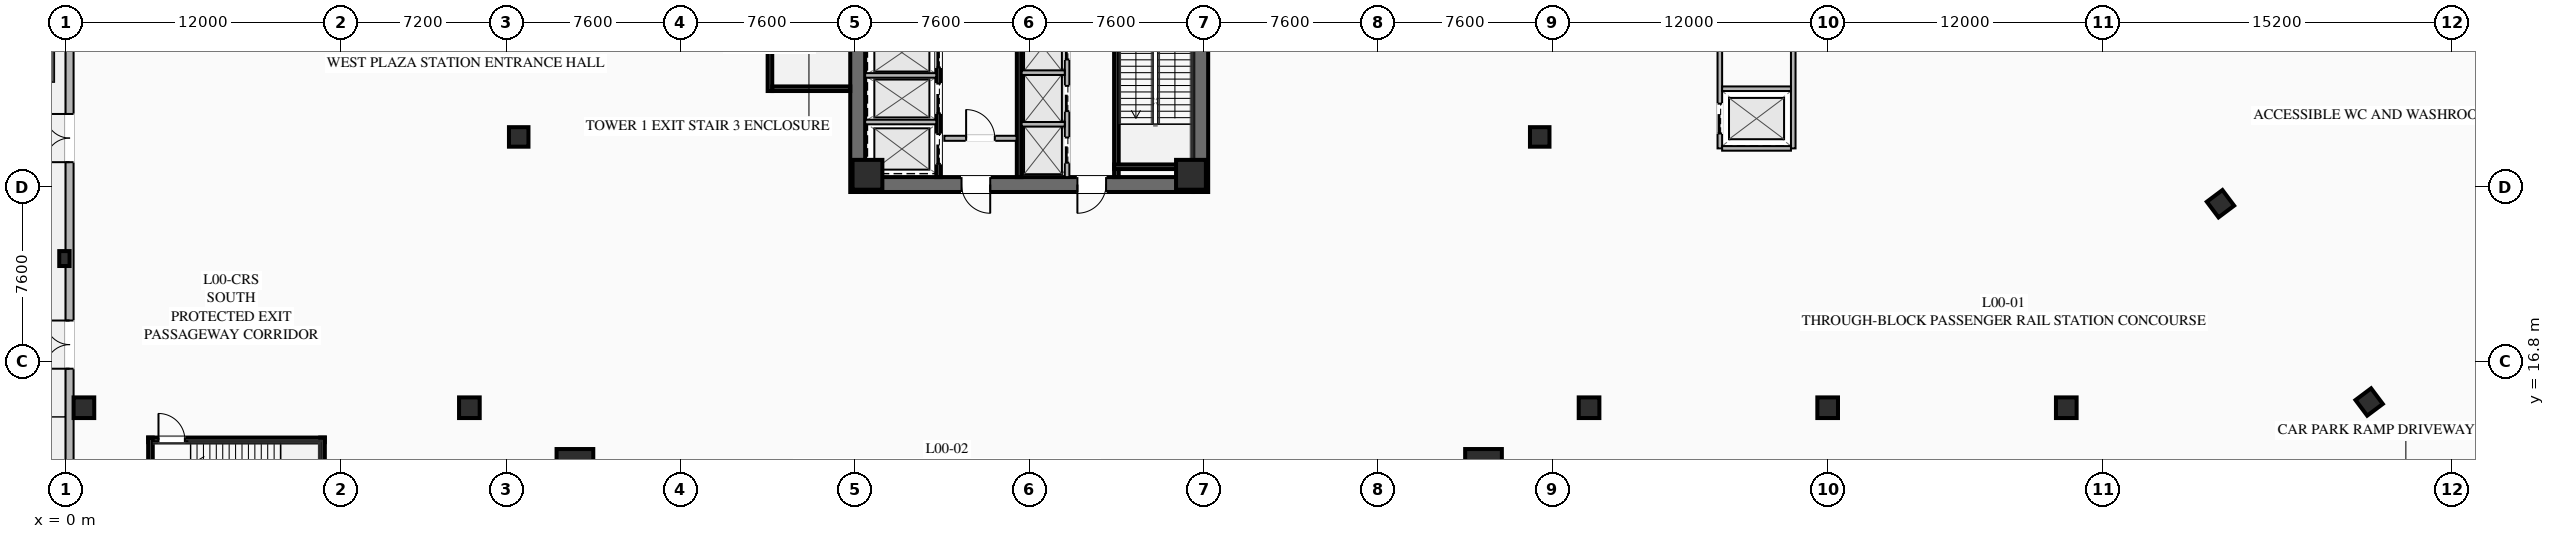
"""IFC4 building model, lengths in metres.
Left out: names, types, materials, properties, quantities, classifications, styles, units other than length and angle.
Written with IfcOpenShell. Run it as: python <this file> out.ifc"""

import sys

from ifc_helpers import new_model, si_unit, direction, frame, frame_2d, origin, origin_2d, place, context, subcontext, project, spatial, rectangle, hollow_rectangle, extrude, element, fill, save


model = new_model("IFC4")
c1 = context("Model", 3, precision=1e-05, world=origin(), true_north=direction((0.0, 1.0)))
c2 = subcontext(c1, "Body", "Model", "MODEL_VIEW")
j1 = project(units=[si_unit("LENGTHUNIT", "METRE"), si_unit("PLANEANGLEUNIT", "RADIAN")], contexts=[c1])
p1 = place(None, origin())
s1 = spatial("IfcSite", under=j1, at=p1, CompositionType="ELEMENT")
p2 = place(p1, origin())
s2 = spatial("IfcBuilding", under=s1, at=p2, CompositionType="ELEMENT")
p3 = place(p2, origin())
s3 = spatial("IfcBuildingStorey", under=s2, at=p3, CompositionType="ELEMENT", Elevation=0.0)
for number, where, z_axis, x_axis in (
    (1, (34.525, 24.2, 0.0), (0.0, 0.0, 1.0), (0.0, 1.0, 0.0)),
    (2, (49.475, 39.8, 0.0), (0.0, 0.0, 1.0), (0.0, -1.0, 0.0)),
):
    element("IfcWall", number, at=place(p3, frame(where, z_axis=z_axis, x_axis=x_axis)), inside=s3, PredefinedType="SHEAR", context=c2, shape_type="SweptSolid", body=[
        extrude(rectangle(XDim=15.6, YDim=0.65, at=frame_2d((7.8, 0.0))), origin(), (0.0, 0.0, 1.0), 5.4),
    ])
p4 = place(p3, frame((49.15, 24.525, 0.0), z_axis=(0.0, 0.0, 1.0), x_axis=(-1.0, 0.0, 0.0)))
e3 = element("IfcWall", 3, at=p4, inside=s3, PredefinedType="SHEAR", context=c2, shape_type="SweptSolid", body=[
    extrude(rectangle(XDim=14.3, YDim=0.65, at=frame_2d((7.15, 0.0))), origin(), (0.0, 0.0, 1.0), 5.4),
])
p5 = place(p4, frame((8.85, 0.0, 0.0)))
e4 = element("IfcOpeningElement", 4, at=p5, cuts=e3, PredefinedType="OPENING", context=c2, shape_type="SweptSolid", body=[
    extrude(rectangle(XDim=1.25, YDim=2.25, at=frame_2d((0.625, 1.125))), frame((0.0, 0.335, 0.0), z_axis=(0.0, -1.0, 0.0), x_axis=(1.0, 0.0, 0.0)), (0.0, 0.0, 1.0), 0.67),
])
p6 = place(p4, frame((3.8, 0.0, 0.0)))
e5 = element("IfcOpeningElement", 5, at=p6, cuts=e3, PredefinedType="OPENING", context=c2, shape_type="SweptSolid", body=[
    extrude(rectangle(XDim=1.25, YDim=2.25, at=frame_2d((0.625, 1.125))), frame((0.0, 0.335, 0.0), z_axis=(0.0, -1.0, 0.0), x_axis=(1.0, 0.0, 0.0)), (0.0, 0.0, 1.0), 0.67),
])
for number, where, z_axis, x_axis in (
    (6, (34.95, 24.95, 0.0), (0.0, 0.0, 1.0), (1.0, 0.0, 0.0)),
    (7, (49.05, 24.95, 0.0), (0.0, 0.0, 1.0), (1.0, 0.0, 0.0)),
):
    element("IfcColumn", number, at=place(p3, frame(where, z_axis=z_axis, x_axis=x_axis)), inside=s3, PredefinedType="COLUMN", context=c2, shape_type="SweptSolid", body=[
        extrude(hollow_rectangle(XDim=1.3, YDim=1.3, WallThickness=0.05, at=origin_2d()), origin(), (0.0, 0.0, 1.0), 5.14),
    ])
for number, where, z_axis, x_axis in (
    (8, (22.2, 12.2, 0.0), (0.0, 0.0, 1.0), (1.0, 0.0, 0.0)),
    (9, (61.8, 12.2, 0.0), (0.0, 0.0, 1.0), (1.0, 0.0, 0.0)),
):
    element("IfcColumn", number, at=place(p3, frame(where, z_axis=z_axis, x_axis=x_axis)), inside=s3, PredefinedType="COLUMN", context=c2, shape_type="SweptSolid", body=[
        extrude(hollow_rectangle(XDim=1.6, YDim=1.6, WallThickness=0.06, at=origin_2d()), origin(), (0.0, 0.0, 1.0), 5.14),
    ])
for number, where, z_axis, x_axis in (
    (10, (64.25, 26.6, 0.0), (0.0, 0.0, 1.0), (1.0, 0.0, 0.0)),
    (11, (19.75, 26.6, 0.0), (0.0, 0.0, 1.0), (1.0, 0.0, 0.0)),
):
    element("IfcColumn", number, at=place(p3, frame(where, z_axis=z_axis, x_axis=x_axis)), inside=s3, PredefinedType="COLUMN", context=c2, shape_type="SweptSolid", body=[
        extrude(hollow_rectangle(XDim=0.85, YDim=0.85, WallThickness=0.035, at=origin_2d()), origin(), (0.0, 0.0, 1.0), 5.14),
    ])
p7 = place(p3, frame((112.476, 21.107, 0.0), z_axis=(0.0, 0.0, 1.0), x_axis=(-0.600005007985, 0.799996243986, 0.0)))
e12 = element("IfcWall", 12, at=p7, inside=s3, PredefinedType="SHEAR", context=c2, shape_type="SweptSolid", body=[
    extrude(rectangle(XDim=15.6, YDim=0.65, at=frame_2d((7.8, 0.0))), origin(), (0.0, 0.0, 1.0), 5.4),
])
for number, where, z_axis, x_axis in (
    (13, (93.92, 23.69, 0.0), (0.0, 0.0, 1.0), (0.8, 0.6, 0.0)),
    (14, (100.4, 15.05, 0.0), (0.0, 0.0, 1.0), (0.8, 0.6, 0.0)),
):
    element("IfcColumn", number, at=place(p3, frame(where, z_axis=z_axis, x_axis=x_axis)), inside=s3, PredefinedType="COLUMN", context=c2, shape_type="SweptSolid", body=[
        extrude(hollow_rectangle(XDim=0.85, YDim=0.85, WallThickness=0.035, at=origin_2d()), origin(), (0.0, 0.0, 1.0), 5.14),
    ])
for number, where, z_axis, x_axis in (
    (15, (0.8, 14.8, 0.0), (0.0, 0.0, 1.0), (1.0, 0.0, 0.0)),
    (16, (17.6, 14.8, 0.0), (0.0, 0.0, 1.0), (1.0, 0.0, 0.0)),
    (17, (66.4, 14.8, 0.0), (0.0, 0.0, 1.0), (1.0, 0.0, 0.0)),
    (18, (76.8, 14.8, 0.0), (0.0, 0.0, 1.0), (1.0, 0.0, 0.0)),
    (19, (87.2, 14.8, 0.0), (0.0, 0.0, 1.0), (1.0, 0.0, 0.0)),
):
    element("IfcColumn", number, at=place(p3, frame(where, z_axis=z_axis, x_axis=x_axis)), inside=s3, PredefinedType="COLUMN", context=c2, shape_type="SweptSolid", body=[
        extrude(rectangle(XDim=0.9, YDim=0.9, at=origin_2d()), origin(), (0.0, 0.0, 1.0), 5.14),
    ])
p8 = place(p3, frame((0.175, 0.35, 0.0), z_axis=(0.0, 0.0, 1.0), x_axis=(0.0, 1.0, 0.0)))
e20 = element("IfcWall", 20, at=p8, inside=s3, PredefinedType="SOLIDWALL", context=c2, shape_type="SweptSolid", body=[
    extrude(rectangle(XDim=63.3, YDim=0.35, at=frame_2d((31.65, 0.0))), origin(), (0.0, 0.0, 1.0), 5.14),
])
p9 = place(p8, frame((16.15, 0.0, 0.0)))
e21 = element("IfcOpeningElement", 21, at=p9, cuts=e20, PredefinedType="OPENING", context=c2, shape_type="SweptSolid", body=[
    extrude(rectangle(XDim=2.1, YDim=2.5, at=frame_2d((1.05, 1.25))), frame((0.0, 0.185, 0.0), z_axis=(0.0, -1.0, 0.0), x_axis=(1.0, 0.0, 0.0)), (0.0, 0.0, 1.0), 0.37),
])
p10 = place(p8, frame((25.15, 0.0, 0.0)))
e22 = element("IfcOpeningElement", 22, at=p10, cuts=e20, PredefinedType="OPENING", context=c2, shape_type="SweptSolid", body=[
    extrude(rectangle(XDim=2.1, YDim=2.5, at=frame_2d((1.05, 1.25))), frame((0.0, 0.185, 0.0), z_axis=(0.0, -1.0, 0.0), x_axis=(1.0, 0.0, 0.0)), (0.0, 0.0, 1.0), 0.37),
])
p11 = place(p8, frame((34.15, 0.0, 0.0)))
e23 = element("IfcOpeningElement", 23, at=p11, cuts=e20, PredefinedType="OPENING", context=c2, shape_type="SweptSolid", body=[
    extrude(rectangle(XDim=2.1, YDim=2.5, at=frame_2d((1.05, 1.25))), frame((0.0, 0.185, 0.0), z_axis=(0.0, -1.0, 0.0), x_axis=(1.0, 0.0, 0.0)), (0.0, 0.0, 1.0), 0.37),
])
p12 = place(p8, frame((39.85, 0.0, 0.0)))
e24 = element("IfcOpeningElement", 24, at=p12, cuts=e20, PredefinedType="OPENING", context=c2, shape_type="SweptSolid", body=[
    extrude(rectangle(XDim=2.1, YDim=2.5, at=frame_2d((1.05, 1.25))), frame((0.0, 0.185, 0.0), z_axis=(0.0, -1.0, 0.0), x_axis=(1.0, 0.0, 0.0)), (0.0, 0.0, 1.0), 0.37),
])
p13 = place(p3, frame((-0.05, 21.3, 0.0), z_axis=(0.0, 0.0, 1.0), x_axis=(0.0, 1.0, 0.0)))
e25 = element("IfcColumn", 25, at=p13, inside=s3, PredefinedType="PILASTER", context=c2, shape_type="SweptSolid", body=[
    extrude(rectangle(XDim=0.65, YDim=0.45, at=origin_2d()), origin(), (0.0, 0.0, 1.0), 5.14),
])
p14 = place(p3, frame((45.8, 24.85, 0.0), z_axis=(0.0, 0.0, 1.0), x_axis=(0.0, 1.0, 0.0)))
e26 = element("IfcWall", 26, at=p14, inside=s3, PredefinedType="SHEAR", context=c2, shape_type="SweptSolid", body=[
    extrude(rectangle(XDim=7.95, YDim=0.2, at=frame_2d((3.975, 0.0))), origin(), (0.0, 0.0, 1.0), 5.14),
])
p15 = place(p14, frame((6.3, 0.0, 0.0)))
e27 = element("IfcOpeningElement", 27, at=p15, cuts=e26, PredefinedType="OPENING", context=c2, shape_type="SweptSolid", body=[
    extrude(rectangle(XDim=1.15, YDim=2.2, at=frame_2d((0.575, 1.1))), frame((0.0, 0.11, 0.0), z_axis=(0.0, -1.0, 0.0), x_axis=(1.0, 0.0, 0.0)), (0.0, 0.0, 1.0), 0.22),
])
p16 = place(p3, frame((45.7, 25.3, 0.0), z_axis=(0.0, 0.0, 1.0), x_axis=(1.0, 0.0, 0.0)))
e28 = element("IfcWall", 28, at=p16, inside=s3, PredefinedType="SHEAR", context=c2, shape_type="SweptSolid", body=[
    extrude(rectangle(XDim=3.45, YDim=0.2, at=frame_2d((1.725, 0.0))), origin(), (0.0, 0.0, 1.0), 5.14),
])
p17 = place(p3, frame((41.56, 24.85, 0.0), z_axis=(0.0, 0.0, 1.0), x_axis=(0.0, 1.0, 0.0)))
e29 = element("IfcWall", 29, at=p17, inside=s3, PredefinedType="SHEAR", context=c2, shape_type="SweptSolid", body=[
    extrude(rectangle(XDim=14.3, YDim=0.2, at=frame_2d((7.15, 0.0))), origin(), (0.0, 0.0, 1.0), 5.14),
])
p18 = place(p3, frame((38.3, 26.54, 0.0), z_axis=(0.0, 0.0, 1.0), x_axis=(1.0, 0.0, 0.0)))
e30 = element("IfcWall", 30, at=p18, inside=s3, PredefinedType="SOLIDWALL", context=c2, shape_type="SweptSolid", body=[
    extrude(rectangle(XDim=3.15, YDim=0.22, at=frame_2d((1.575, 0.0))), origin(), (0.0, 0.0, 1.0), 3.31),
])
p19 = place(p18, frame((0.95, 0.0, 0.0)))
e31 = element("IfcOpeningElement", 31, at=p19, cuts=e30, PredefinedType="OPENING", context=c2, shape_type="SweptSolid", body=[
    extrude(rectangle(XDim=1.25, YDim=2.25, at=frame_2d((0.625, 1.125))), frame((0.0, 0.12, 0.0), z_axis=(0.0, -1.0, 0.0), x_axis=(1.0, 0.0, 0.0)), (0.0, 0.0, 1.0), 0.24),
])
p20 = place(p3, frame((38.05, 24.85, 0.0), z_axis=(0.0, 0.0, 1.0), x_axis=(0.0, 1.0, 0.0)))
e32 = element("IfcWall", 32, at=p20, inside=s3, PredefinedType="SHEAR", context=c2, shape_type="SweptSolid", body=[
    extrude(rectangle(XDim=6.35, YDim=0.2, at=frame_2d((3.175, 0.0))), origin(), (0.0, 0.0, 1.0), 5.14),
])
p21 = place(p20, frame((4.775, 0.0, 0.0)))
e33 = element("IfcOpeningElement", 33, at=p21, cuts=e32, PredefinedType="OPENING", context=c2, shape_type="SweptSolid", body=[
    extrude(rectangle(XDim=1.3, YDim=2.25, at=frame_2d((0.65, 1.125))), frame((0.0, 0.11, 0.0), z_axis=(0.0, -1.0, 0.0), x_axis=(1.0, 0.0, 0.0)), (0.0, 0.0, 1.0), 0.22),
])
p22 = place(p20, frame((2.775, 0.0, 0.0)))
e34 = element("IfcOpeningElement", 34, at=p22, cuts=e32, PredefinedType="OPENING", context=c2, shape_type="SweptSolid", body=[
    extrude(rectangle(XDim=1.3, YDim=2.25, at=frame_2d((0.65, 1.125))), frame((0.0, 0.11, 0.0), z_axis=(0.0, -1.0, 0.0), x_axis=(1.0, 0.0, 0.0)), (0.0, 0.0, 1.0), 0.22),
])
p23 = place(p20, frame((0.575, 0.0, 0.0)))
e35 = element("IfcOpeningElement", 35, at=p23, cuts=e32, PredefinedType="OPENING", context=c2, shape_type="SweptSolid", body=[
    extrude(rectangle(XDim=1.3, YDim=2.25, at=frame_2d((0.65, 1.125))), frame((0.0, 0.11, 0.0), z_axis=(0.0, -1.0, 0.0), x_axis=(1.0, 0.0, 0.0)), (0.0, 0.0, 1.0), 0.22),
])
for number, where, z_axis, x_axis in (
    (36, (34.85, 27.25, 0.0), (0.0, 0.0, 1.0), (1.0, 0.0, 0.0)),
    (37, (34.85, 29.28, 0.0), (0.0, 0.0, 1.0), (1.0, 0.0, 0.0)),
):
    element("IfcWall", number, at=place(p3, frame(where, z_axis=z_axis, x_axis=x_axis)), inside=s3, PredefinedType="SOLIDWALL", context=c2, shape_type="SweptSolid", body=[
        extrude(rectangle(XDim=3.1, YDim=0.2, at=frame_2d((1.55, 0.0))), origin(), (0.0, 0.0, 1.0), 5.14),
    ])
p24 = place(p3, frame((43.65, 24.85, 0.0), z_axis=(0.0, 0.0, 1.0), x_axis=(0.0, 1.0, 0.0)))
e38 = element("IfcWall", 38, at=p24, inside=s3, PredefinedType="SOLIDWALL", context=c2, shape_type="SweptSolid", body=[
    extrude(rectangle(XDim=6.8, YDim=0.2, at=frame_2d((3.4, 0.0))), origin(), (0.0, 0.0, 1.0), 5.14),
])
p25 = place(p24, frame((0.625, 0.0, 0.0)))
e39 = element("IfcOpeningElement", 39, at=p25, cuts=e38, PredefinedType="OPENING", context=c2, shape_type="SweptSolid", body=[
    extrude(rectangle(XDim=1.1, YDim=2.2, at=frame_2d((0.55, 1.1))), frame((0.0, 0.11, 0.0), z_axis=(0.0, -1.0, 0.0), x_axis=(1.0, 0.0, 0.0)), (0.0, 0.0, 1.0), 0.22),
])
p26 = place(p24, frame((2.875, 0.0, 0.0)))
e40 = element("IfcOpeningElement", 40, at=p26, cuts=e38, PredefinedType="OPENING", context=c2, shape_type="SweptSolid", body=[
    extrude(rectangle(XDim=1.1, YDim=2.2, at=frame_2d((0.55, 1.1))), frame((0.0, 0.11, 0.0), z_axis=(0.0, -1.0, 0.0), x_axis=(1.0, 0.0, 0.0)), (0.0, 0.0, 1.0), 0.22),
])
p27 = place(p24, frame((5.125, 0.0, 0.0)))
e41 = element("IfcOpeningElement", 41, at=p27, cuts=e38, PredefinedType="OPENING", context=c2, shape_type="SweptSolid", body=[
    extrude(rectangle(XDim=1.1, YDim=2.2, at=frame_2d((0.55, 1.1))), frame((0.0, 0.11, 0.0), z_axis=(0.0, -1.0, 0.0), x_axis=(1.0, 0.0, 0.0)), (0.0, 0.0, 1.0), 0.22),
])
for number, where, z_axis, x_axis in (
    (42, (41.67, 27.15, 0.0), (0.0, 0.0, 1.0), (1.0, 0.0, 0.0)),
    (43, (41.67, 29.4, 0.0), (0.0, 0.0, 1.0), (1.0, 0.0, 0.0)),
):
    element("IfcWall", number, at=place(p3, frame(where, z_axis=z_axis, x_axis=x_axis)), inside=s3, PredefinedType="SOLIDWALL", context=c2, shape_type="SweptSolid", body=[
        extrude(rectangle(XDim=1.88, YDim=0.2, at=frame_2d((0.94, 0.0))), origin(), (0.0, 0.0, 1.0), 5.14),
    ])
p28 = place(p3, frame((30.7, 28.6, 0.0), z_axis=(0.0, 0.0, 1.0), x_axis=(0.0, 1.0, 0.0)))
e44 = element("IfcWall", 44, at=p28, inside=s3, PredefinedType="SHEAR", context=c2, shape_type="SweptSolid", body=[
    extrude(rectangle(XDim=6.8, YDim=0.2, at=frame_2d((3.4, 0.0))), origin(), (0.0, 0.0, 1.0), 5.14),
])
p29 = place(p3, frame((30.8, 28.7, 0.0), z_axis=(0.0, 0.0, 1.0), x_axis=(1.0, 0.0, 0.0)))
e45 = element("IfcWall", 45, at=p29, inside=s3, PredefinedType="SHEAR", context=c2, shape_type="SweptSolid", body=[
    extrude(rectangle(XDim=3.4, YDim=0.2, at=frame_2d((1.7, 0.0))), origin(), (0.0, 0.0, 1.0), 5.14),
])
p30 = place(p3, frame((3.6, 13.4, 0.0), z_axis=(0.0, 0.0, 1.0), x_axis=(1.0, 0.0, 0.0)))
e46 = element("IfcWall", 46, at=p30, inside=s3, PredefinedType="SHEAR", context=c2, shape_type="SweptSolid", body=[
    extrude(rectangle(XDim=7.7, YDim=0.2, at=frame_2d((3.85, 0.0))), origin(), (0.0, 0.0, 1.0), 5.14),
])
p31 = place(p30, frame((0.45, 0.0, 0.0)))
e47 = element("IfcOpeningElement", 47, at=p31, cuts=e46, PredefinedType="OPENING", context=c2, shape_type="SweptSolid", body=[
    extrude(rectangle(XDim=1.15, YDim=2.2, at=frame_2d((0.575, 1.1))), frame((0.0, 0.11, 0.0), z_axis=(0.0, -1.0, 0.0), x_axis=(1.0, 0.0, 0.0)), (0.0, 0.0, 1.0), 0.22),
])
for number, where, z_axis, x_axis in (
    (48, (3.7, 9.6, 0.0), (0.0, 0.0, 1.0), (0.0, 1.0, 0.0)),
    (49, (11.2, 9.6, 0.0), (0.0, 0.0, 1.0), (0.0, 1.0, 0.0)),
):
    element("IfcWall", number, at=place(p3, frame(where, z_axis=z_axis, x_axis=x_axis)), inside=s3, PredefinedType="SHEAR", context=c2, shape_type="SweptSolid", body=[
        extrude(rectangle(XDim=3.9, YDim=0.2, at=frame_2d((1.95, 0.0))), origin(), (0.0, 0.0, 1.0), 5.14),
    ])
p32 = place(p3, frame((72.1, 26.1, 0.0), z_axis=(0.0, 0.0, 1.0), x_axis=(0.0, 1.0, 0.0)))
e50 = element("IfcWall", 50, at=p32, inside=s3, PredefinedType="SOLIDWALL", context=c2, shape_type="SweptSolid", body=[
    extrude(rectangle(XDim=11.8, YDim=0.2, at=frame_2d((5.9, 0.0))), origin(), (0.0, 0.0, 1.0), 3.31),
])
p33 = place(p32, frame((0.65, 0.0, 0.0)))
e51 = element("IfcOpeningElement", 51, at=p33, cuts=e50, PredefinedType="OPENING", context=c2, shape_type="SweptSolid", body=[
    extrude(rectangle(XDim=1.3, YDim=2.25, at=frame_2d((0.65, 1.125))), frame((0.0, 0.11, 0.0), z_axis=(0.0, -1.0, 0.0), x_axis=(1.0, 0.0, 0.0)), (0.0, 0.0, 1.0), 0.22),
])
p34 = place(p32, frame((9.85, 0.0, 0.0)))
e52 = element("IfcOpeningElement", 52, at=p34, cuts=e50, PredefinedType="OPENING", context=c2, shape_type="SweptSolid", body=[
    extrude(rectangle(XDim=1.3, YDim=2.25, at=frame_2d((0.65, 1.125))), frame((0.0, 0.11, 0.0), z_axis=(0.0, -1.0, 0.0), x_axis=(1.0, 0.0, 0.0)), (0.0, 0.0, 1.0), 0.22),
])
p35 = place(p3, frame((75.3, 26.1, 0.0), z_axis=(0.0, 0.0, 1.0), x_axis=(0.0, 1.0, 0.0)))
e53 = element("IfcWall", 53, at=p35, inside=s3, PredefinedType="SOLIDWALL", context=c2, shape_type="SweptSolid", body=[
    extrude(rectangle(XDim=11.8, YDim=0.2, at=frame_2d((5.9, 0.0))), origin(), (0.0, 0.0, 1.0), 3.31),
])
for number, where, z_axis, x_axis in (
    (54, (72.2, 26.1, 0.0), (0.0, 0.0, 1.0), (1.0, 0.0, 0.0)),
    (55, (72.2, 28.7, 0.0), (0.0, 0.0, 1.0), (1.0, 0.0, 0.0)),
):
    element("IfcWall", number, at=place(p3, frame(where, z_axis=z_axis, x_axis=x_axis)), inside=s3, PredefinedType="SOLIDWALL", context=c2, shape_type="SweptSolid", body=[
        extrude(rectangle(XDim=3.0, YDim=0.2, at=frame_2d((1.5, 0.0))), origin(), (0.0, 0.0, 1.0), 3.31),
    ])
p36 = place(p9, origin())
e56 = element("IfcDoor", 56, at=p36, inside=s3, OperationType="DOUBLE_DOOR_SINGLE_SWING", PredefinedType="DOOR", context=c2, shape_type="SweptSolid", body=[
    extrude(rectangle(XDim=2.1, YDim=2.5, at=frame_2d((1.05, 1.25))), frame((0.0, 0.025, 0.0), z_axis=(0.0, -1.0, 0.0), x_axis=(1.0, 0.0, 0.0)), (0.0, 0.0, 1.0), 0.05),
])
fill(e21, e56)
p37 = place(p10, origin())
e57 = element("IfcDoor", 57, at=p37, inside=s3, OperationType="DOUBLE_DOOR_SINGLE_SWING", PredefinedType="DOOR", context=c2, shape_type="SweptSolid", body=[
    extrude(rectangle(XDim=2.1, YDim=2.5, at=frame_2d((1.05, 1.25))), frame((0.0, 0.025, 0.0), z_axis=(0.0, -1.0, 0.0), x_axis=(1.0, 0.0, 0.0)), (0.0, 0.0, 1.0), 0.05),
])
fill(e22, e57)
p38 = place(p5, origin())
e58 = element("IfcDoor", 58, at=p38, inside=s3, OperationType="SINGLE_SWING_LEFT", PredefinedType="DOOR", context=c2, shape_type="SweptSolid", body=[
    extrude(rectangle(XDim=1.25, YDim=2.25, at=frame_2d((0.625, 1.125))), frame((0.0, 0.025, 0.0), z_axis=(0.0, -1.0, 0.0), x_axis=(1.0, 0.0, 0.0)), (0.0, 0.0, 1.0), 0.05),
])
fill(e4, e58)
p39 = place(p6, origin())
e59 = element("IfcDoor", 59, at=p39, inside=s3, OperationType="SINGLE_SWING_RIGHT", PredefinedType="DOOR", context=c2, shape_type="SweptSolid", body=[
    extrude(rectangle(XDim=1.25, YDim=2.25, at=frame_2d((0.625, 1.125))), frame((0.0, 0.025, 0.0), z_axis=(0.0, -1.0, 0.0), x_axis=(1.0, 0.0, 0.0)), (0.0, 0.0, 1.0), 0.05),
])
fill(e5, e59)
p40 = place(p19, origin())
e60 = element("IfcDoor", 60, at=p40, inside=s3, OperationType="SINGLE_SWING_LEFT", PredefinedType="DOOR", context=c2, shape_type="SweptSolid", body=[
    extrude(rectangle(XDim=1.25, YDim=2.25, at=frame_2d((0.625, 1.125))), frame((0.0, 0.025, 0.0), z_axis=(0.0, -1.0, 0.0), x_axis=(1.0, 0.0, 0.0)), (0.0, 0.0, 1.0), 0.05),
])
fill(e31, e60)
p41 = place(p31, origin())
e61 = element("IfcDoor", 61, at=p41, inside=s3, OperationType="SINGLE_SWING_LEFT", PredefinedType="DOOR", context=c2, shape_type="SweptSolid", body=[
    extrude(rectangle(XDim=1.15, YDim=2.2, at=frame_2d((0.575, 1.1))), frame((0.0, 0.025, 0.0), z_axis=(0.0, -1.0, 0.0), x_axis=(1.0, 0.0, 0.0)), (0.0, 0.0, 1.0), 0.05),
])
fill(e47, e61)
p42 = place(p21, origin())
e62 = element("IfcDoor", 62, at=p42, inside=s3, OperationType="SLIDING_TO_LEFT", PredefinedType="DOOR", context=c2, shape_type="SweptSolid", body=[
    extrude(rectangle(XDim=1.3, YDim=2.25, at=frame_2d((0.65, 1.125))), frame((0.0, 0.025, 0.0), z_axis=(0.0, -1.0, 0.0), x_axis=(1.0, 0.0, 0.0)), (0.0, 0.0, 1.0), 0.05),
])
fill(e33, e62)
p43 = place(p22, origin())
e63 = element("IfcDoor", 63, at=p43, inside=s3, OperationType="SLIDING_TO_LEFT", PredefinedType="DOOR", context=c2, shape_type="SweptSolid", body=[
    extrude(rectangle(XDim=1.3, YDim=2.25, at=frame_2d((0.65, 1.125))), frame((0.0, 0.025, 0.0), z_axis=(0.0, -1.0, 0.0), x_axis=(1.0, 0.0, 0.0)), (0.0, 0.0, 1.0), 0.05),
])
fill(e34, e63)
p44 = place(p23, origin())
e64 = element("IfcDoor", 64, at=p44, inside=s3, OperationType="SLIDING_TO_LEFT", PredefinedType="DOOR", context=c2, shape_type="SweptSolid", body=[
    extrude(rectangle(XDim=1.3, YDim=2.25, at=frame_2d((0.65, 1.125))), frame((0.0, 0.025, 0.0), z_axis=(0.0, -1.0, 0.0), x_axis=(1.0, 0.0, 0.0)), (0.0, 0.0, 1.0), 0.05),
])
fill(e35, e64)
p45 = place(p25, origin())
e65 = element("IfcDoor", 65, at=p45, inside=s3, OperationType="SLIDING_TO_LEFT", PredefinedType="DOOR", context=c2, shape_type="SweptSolid", body=[
    extrude(rectangle(XDim=1.1, YDim=2.2, at=frame_2d((0.55, 1.1))), frame((0.0, 0.025, 0.0), z_axis=(0.0, -1.0, 0.0), x_axis=(1.0, 0.0, 0.0)), (0.0, 0.0, 1.0), 0.05),
])
fill(e39, e65)
p46 = place(p26, origin())
e66 = element("IfcDoor", 66, at=p46, inside=s3, OperationType="SLIDING_TO_LEFT", PredefinedType="DOOR", context=c2, shape_type="SweptSolid", body=[
    extrude(rectangle(XDim=1.1, YDim=2.2, at=frame_2d((0.55, 1.1))), frame((0.0, 0.025, 0.0), z_axis=(0.0, -1.0, 0.0), x_axis=(1.0, 0.0, 0.0)), (0.0, 0.0, 1.0), 0.05),
])
fill(e40, e66)
p47 = place(p27, origin())
e67 = element("IfcDoor", 67, at=p47, inside=s3, OperationType="SLIDING_TO_LEFT", PredefinedType="DOOR", context=c2, shape_type="SweptSolid", body=[
    extrude(rectangle(XDim=1.1, YDim=2.2, at=frame_2d((0.55, 1.1))), frame((0.0, 0.025, 0.0), z_axis=(0.0, -1.0, 0.0), x_axis=(1.0, 0.0, 0.0)), (0.0, 0.0, 1.0), 0.05),
])
fill(e41, e67)
p48 = place(p33, origin())
e68 = element("IfcDoor", 68, at=p48, inside=s3, OperationType="SLIDING_TO_LEFT", PredefinedType="DOOR", context=c2, shape_type="SweptSolid", body=[
    extrude(rectangle(XDim=1.3, YDim=2.25, at=frame_2d((0.65, 1.125))), frame((0.0, 0.025, 0.0), z_axis=(0.0, -1.0, 0.0), x_axis=(1.0, 0.0, 0.0)), (0.0, 0.0, 1.0), 0.05),
])
fill(e51, e68)
save(model, sys.argv[1])
